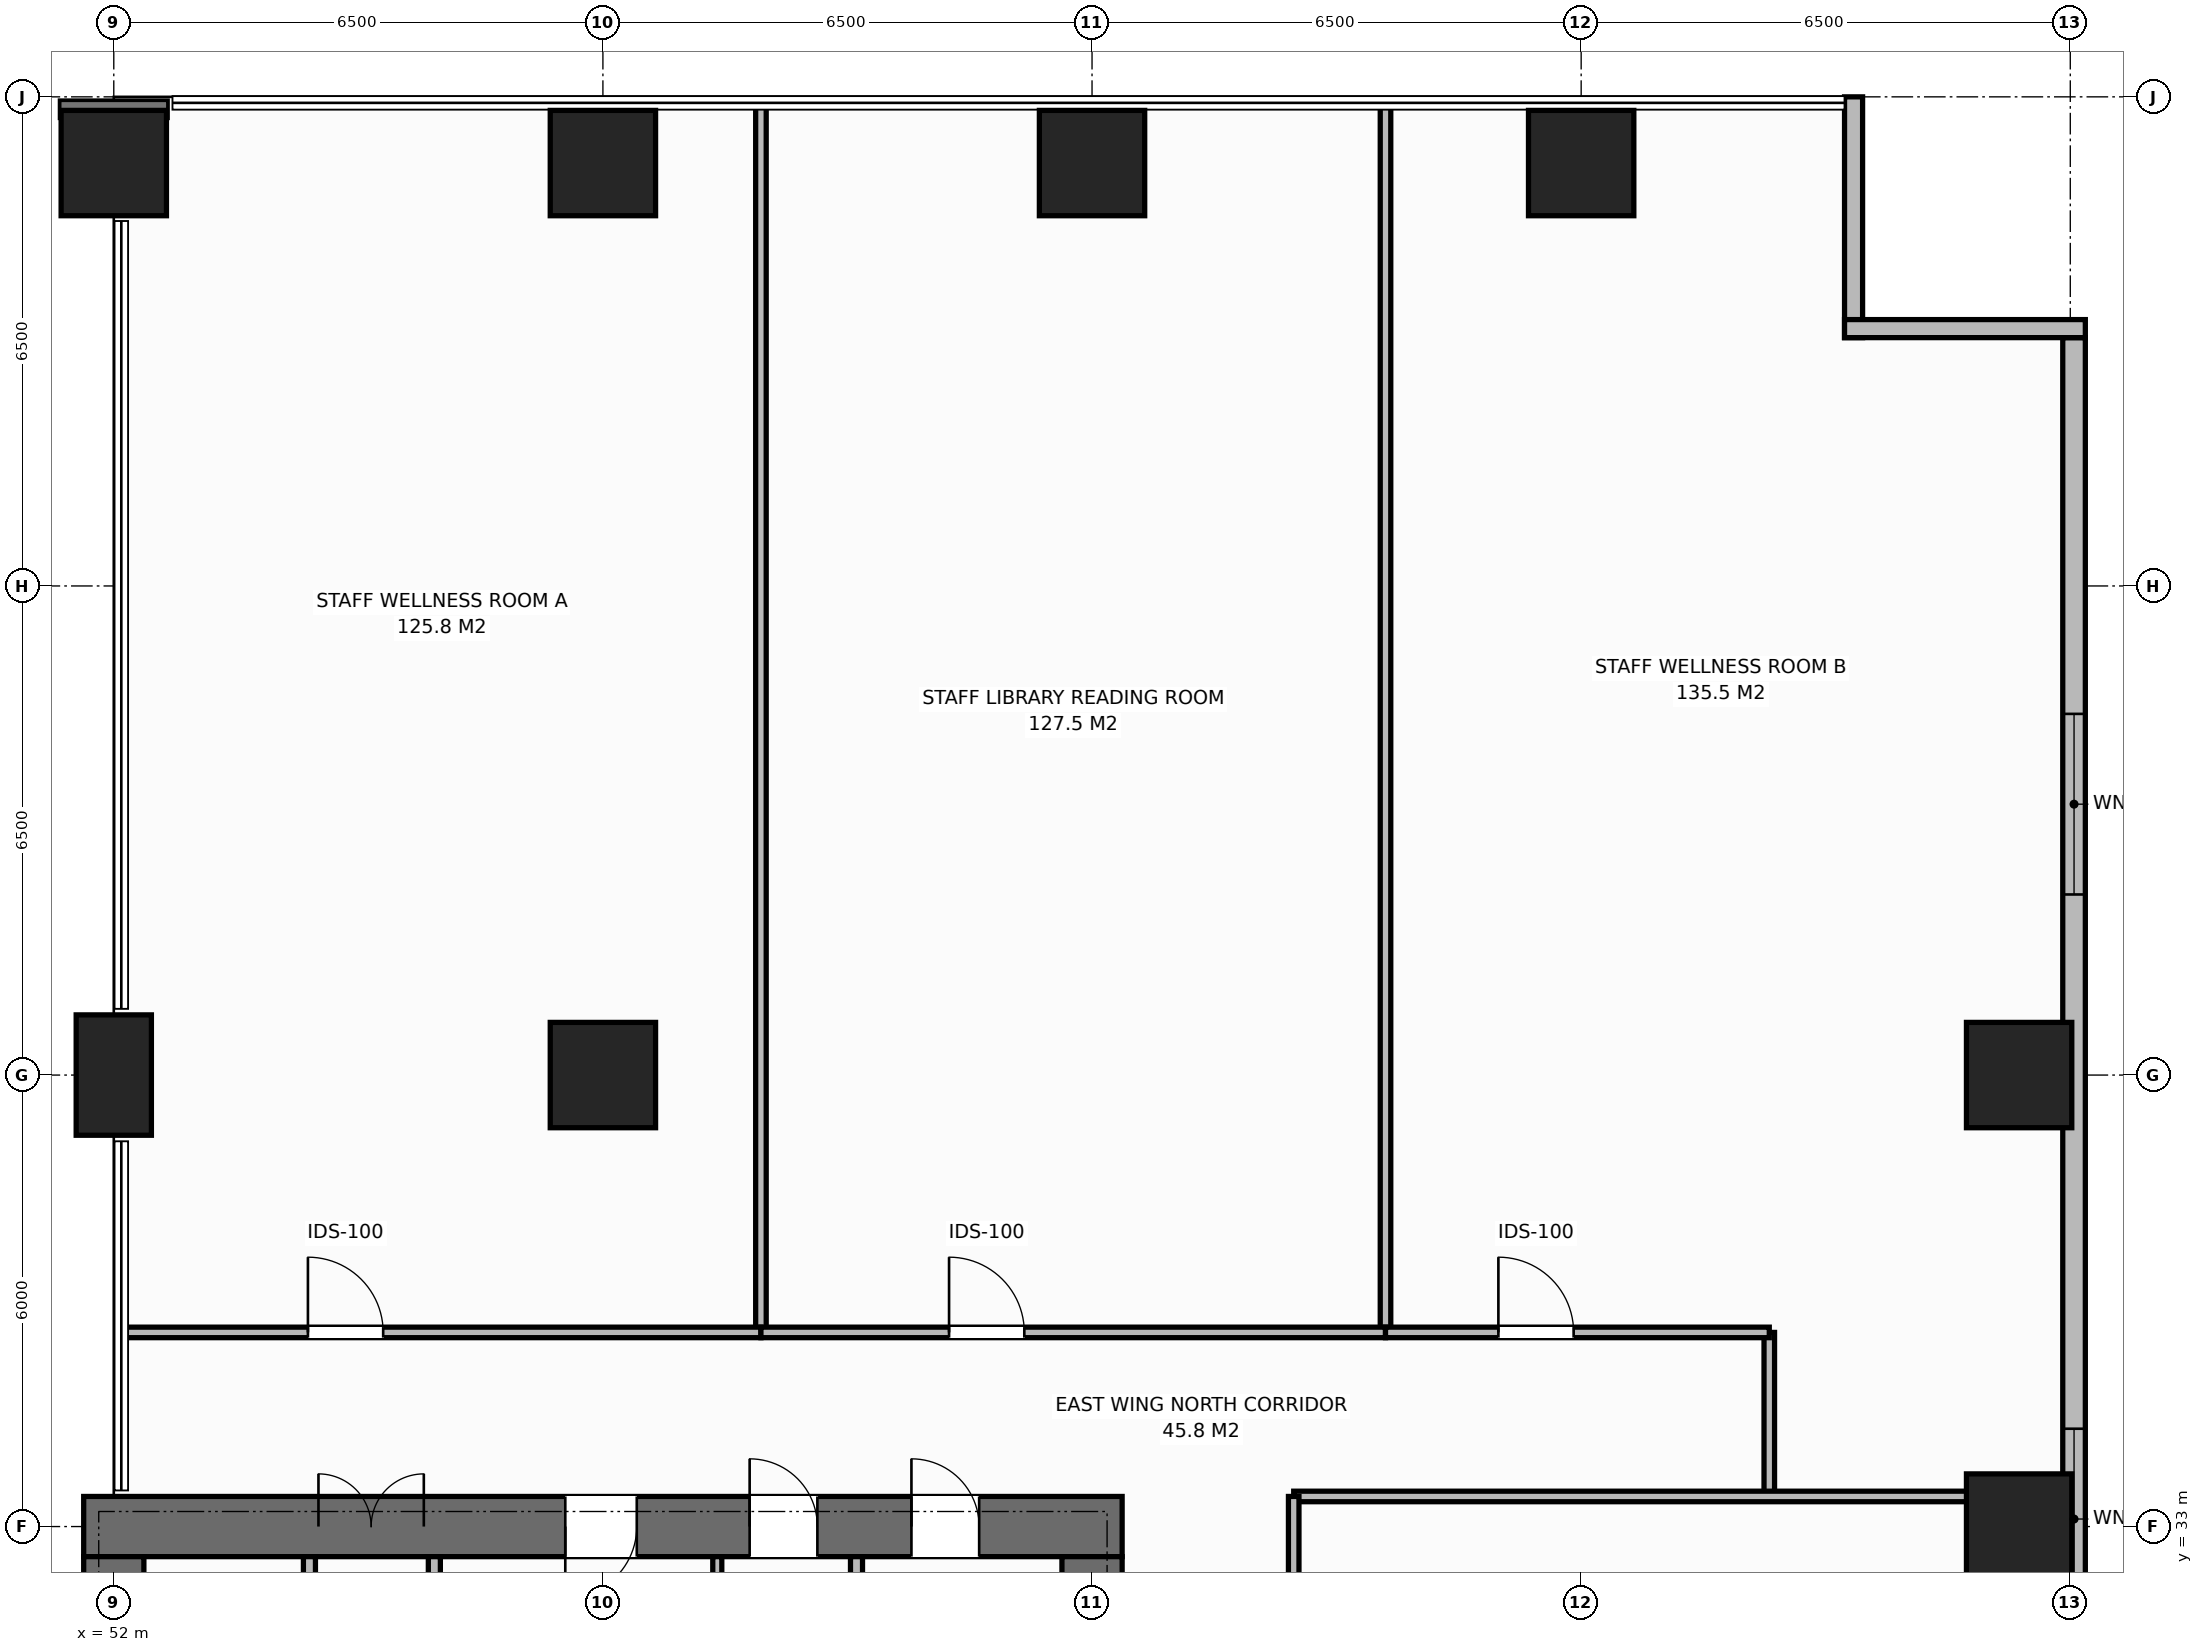
"""IFC4 building model, lengths in metres.
Left out: names, types, materials, properties, quantities, classifications, styles, units other than length and angle.
Written with IfcOpenShell. Run it as: python <this file> out.ifc"""

import sys

from ifc_helpers import new_model, si_unit, direction, frame, frame_2d, origin, origin_2d, place, context, subcontext, project, spatial, rectangle, extrude, element, fill, save


model = new_model("IFC4")
c1 = context("Model", 3, precision=1e-05, world=origin(), true_north=direction((0.0, 1.0)))
c2 = subcontext(c1, "Body", "Model", "MODEL_VIEW")
j1 = project(units=[si_unit("LENGTHUNIT", "METRE"), si_unit("PLANEANGLEUNIT", "RADIAN")], contexts=[c1])
p1 = place(None, origin())
s1 = spatial("IfcSite", under=j1, at=p1, CompositionType="ELEMENT")
p2 = place(p1, origin())
s2 = spatial("IfcBuilding", under=s1, at=p2, CompositionType="ELEMENT")
p3 = place(p2, frame((0.0, 0.0, 17.0)))
s3 = spatial("IfcBuildingStorey", under=s2, at=p3, CompositionType="ELEMENT", Elevation=17.0)
p4 = place(p3, frame((51.6, 33.0, 0.0), z_axis=(0.0, 0.0, 1.0), x_axis=(1.0, 0.0, 0.0)))
e1 = element("IfcWall", 1, at=p4, inside=s3, PredefinedType="SHEAR", context=c2, shape_type="SweptSolid", body=[
    extrude(rectangle(XDim=13.8, YDim=0.8, at=frame_2d((6.9, 0.0))), origin(), (0.0, 0.0, 1.0), 5.0),
])
p5 = place(p4, frame((3.12, 0.0, 0.0)))
e2 = element("IfcOpeningElement", 2, at=p5, cuts=e1, PredefinedType="OPENING", context=c2, shape_type="SweptSolid", body=[
    extrude(rectangle(XDim=1.4, YDim=2.2, at=frame_2d((0.7, 1.1))), frame((0.0, 0.41, 0.0), z_axis=(0.0, -1.0, 0.0), x_axis=(1.0, 0.0, 0.0)), (0.0, 0.0, 1.0), 0.82),
])
p6 = place(p4, frame((11.0, 0.0, 0.0)))
e3 = element("IfcOpeningElement", 3, at=p6, cuts=e1, PredefinedType="OPENING", context=c2, shape_type="SweptSolid", body=[
    extrude(rectangle(XDim=0.9, YDim=2.15, at=frame_2d((0.45, 1.075))), frame((0.0, 0.41, 0.0), z_axis=(0.0, -1.0, 0.0), x_axis=(1.0, 0.0, 0.0)), (0.0, 0.0, 1.0), 0.82),
])
p7 = place(p4, frame((6.4, 0.0, 0.0)))
e4 = element("IfcOpeningElement", 4, at=p7, cuts=e1, PredefinedType="OPENING", context=c2, shape_type="SweptSolid", body=[
    extrude(rectangle(XDim=0.95, YDim=2.15, at=frame_2d((0.475, 1.075))), frame((0.0, 0.41, 0.0), z_axis=(0.0, -1.0, 0.0), x_axis=(1.0, 0.0, 0.0)), (0.0, 0.0, 1.0), 0.82),
])
p8 = place(p4, frame((8.85, 0.0, 0.0)))
e5 = element("IfcOpeningElement", 5, at=p8, cuts=e1, PredefinedType="OPENING", context=c2, shape_type="SweptSolid", body=[
    extrude(rectangle(XDim=0.9, YDim=2.15, at=frame_2d((0.45, 1.075))), frame((0.0, 0.41, 0.0), z_axis=(0.0, -1.0, 0.0), x_axis=(1.0, 0.0, 0.0)), (0.0, 0.0, 1.0), 0.82),
])
p9 = place(p3, frame((52.0, 19.4, 0.0), z_axis=(0.0, 0.0, 1.0), x_axis=(0.0, 1.0, 0.0)))
e6 = element("IfcWall", 6, at=p9, inside=s3, PredefinedType="SHEAR", context=c2, shape_type="SweptSolid", body=[
    extrude(rectangle(XDim=13.2, YDim=0.8, at=frame_2d((6.6, 0.0))), origin(), (0.0, 0.0, 1.0), 5.0),
])
p10 = place(p3, frame((65.0, 19.4, 0.0), z_axis=(0.0, 0.0, 1.0), x_axis=(0.0, 1.0, 0.0)))
e7 = element("IfcWall", 7, at=p10, inside=s3, PredefinedType="SHEAR", context=c2, shape_type="SweptSolid", body=[
    extrude(rectangle(XDim=13.2, YDim=0.8, at=frame_2d((6.6, 0.0))), origin(), (0.0, 0.0, 1.0), 5.0),
])
p11 = place(p10, frame((8.05, 0.0, 0.0)))
e8 = element("IfcOpeningElement", 8, at=p11, cuts=e7, PredefinedType="OPENING", context=c2, shape_type="SweptSolid", body=[
    extrude(rectangle(XDim=1.3, YDim=2.2, at=frame_2d((0.65, 1.1))), frame((0.0, 0.41, 0.0), z_axis=(0.0, -1.0, 0.0), x_axis=(1.0, 0.0, 0.0)), (0.0, 0.0, 1.0), 0.82),
])
p12 = place(p3, frame((58.5, 39.0, 0.0), z_axis=(0.0, 0.0, 1.0), x_axis=(1.0, 0.0, 0.0)))
e9 = element("IfcColumn", 9, at=p12, inside=s3, PredefinedType="COLUMN", context=c2, shape_type="SweptSolid", body=[
    extrude(rectangle(XDim=1.4, YDim=1.4, at=origin_2d()), origin(), (0.0, 0.0, 1.0), 5.0),
])
p13 = place(p3, frame((52.0, 39.0, 0.0), z_axis=(0.0, 0.0, 1.0), x_axis=(1.0, 0.0, 0.0)))
e10 = element("IfcColumn", 10, at=p13, inside=s3, PredefinedType="PILASTER", context=c2, shape_type="SweptSolid", body=[
    extrude(rectangle(XDim=1.0, YDim=1.6, at=origin_2d()), origin(), (0.0, 0.0, 1.0), 5.0),
])
for number, where, z_axis, x_axis in (
    (11, (52.0, 51.12, 0.0), (0.0, 0.0, 1.0), (1.0, 0.0, 0.0)),
    (12, (58.5, 51.12, 0.0), (0.0, 0.0, 1.0), (1.0, 0.0, 0.0)),
    (13, (65.0, 51.12, 0.0), (0.0, 0.0, 1.0), (1.0, 0.0, 0.0)),
    (14, (71.5, 51.12, 0.0), (0.0, 0.0, 1.0), (1.0, 0.0, 0.0)),
    (15, (77.32, 33.0, 0.0), (0.0, 0.0, 1.0), (1.0, 0.0, 0.0)),
    (16, (77.32, 39.0, 0.0), (0.0, 0.0, 1.0), (1.0, 0.0, 0.0)),
):
    element("IfcColumn", number, at=place(p3, frame(where, z_axis=z_axis, x_axis=x_axis)), inside=s3, PredefinedType="COLUMN", context=c2, shape_type="SweptSolid", body=[
        extrude(rectangle(XDim=1.4, YDim=1.4, at=origin_2d()), origin(), (0.0, 0.0, 1.0), 5.0),
    ])
p14 = place(p3, frame((78.05, 48.8, 0.0), z_axis=(0.0, 0.0, 1.0), x_axis=(0.0, -1.0, 0.0)))
e17 = element("IfcWall", 17, at=p14, inside=s3, PredefinedType="STANDARD", context=c2, shape_type="SweptSolid", body=[
    extrude(rectangle(XDim=45.6, YDim=0.3, at=frame_2d((22.8, 0.0))), origin(), (0.0, 0.0, 1.0), 4.4),
])
p15 = place(p14, frame((5.0, 0.0, 0.9)))
e18 = element("IfcOpeningElement", 18, at=p15, cuts=e17, PredefinedType="OPENING", context=c2, shape_type="SweptSolid", body=[
    extrude(rectangle(XDim=2.4, YDim=2.2, at=frame_2d((1.2, 1.1))), frame((0.0, 0.16, 0.0), z_axis=(0.0, -1.0, 0.0), x_axis=(1.0, 0.0, 0.0)), (0.0, 0.0, 1.0), 0.32),
])
p16 = place(p14, frame((14.5, 0.0, 0.9)))
e19 = element("IfcOpeningElement", 19, at=p16, cuts=e17, PredefinedType="OPENING", context=c2, shape_type="SweptSolid", body=[
    extrude(rectangle(XDim=2.4, YDim=2.2, at=frame_2d((1.2, 1.1))), frame((0.0, 0.16, 0.0), z_axis=(0.0, -1.0, 0.0), x_axis=(1.0, 0.0, 0.0)), (0.0, 0.0, 1.0), 0.32),
])
p17 = place(p14, frame((25.5, 0.0, 0.9)))
e20 = element("IfcOpeningElement", 20, at=p17, cuts=e17, PredefinedType="OPENING", context=c2, shape_type="SweptSolid", body=[
    extrude(rectangle(XDim=2.4, YDim=2.2, at=frame_2d((1.2, 1.1))), frame((0.0, 0.16, 0.0), z_axis=(0.0, -1.0, 0.0), x_axis=(1.0, 0.0, 0.0)), (0.0, 0.0, 1.0), 0.32),
])
p18 = place(p14, frame((35.0, 0.0, 0.9)))
e21 = element("IfcOpeningElement", 21, at=p18, cuts=e17, PredefinedType="OPENING", context=c2, shape_type="SweptSolid", body=[
    extrude(rectangle(XDim=2.4, YDim=2.2, at=frame_2d((1.2, 1.1))), frame((0.0, 0.16, 0.0), z_axis=(0.0, -1.0, 0.0), x_axis=(1.0, 0.0, 0.0)), (0.0, 0.0, 1.0), 0.32),
])
for number, where, z_axis, x_axis in (
    (22, (75.12, 52.0, 0.0), (0.0, 0.0, 1.0), (0.0, -1.0, 0.0)),
    (23, (75.0, 48.92, 0.0), (0.0, 0.0, 1.0), (1.0, 0.0, 0.0)),
):
    element("IfcWall", number, at=place(p3, frame(where, z_axis=z_axis, x_axis=x_axis)), inside=s3, PredefinedType="STANDARD", context=c2, shape_type="SweptSolid", body=[
        extrude(rectangle(XDim=3.2, YDim=0.24, at=frame_2d((1.6, 0.0))), origin(), (0.0, 0.0, 1.0), 4.4),
    ])
p19 = place(p3, frame((54.6, 19.4, 0.0), z_axis=(0.0, 0.0, 1.0), x_axis=(0.0, 1.0, 0.0)))
e24 = element("IfcWall", 24, at=p19, inside=s3, PredefinedType="STANDARD", context=c2, shape_type="SweptSolid", body=[
    extrude(rectangle(XDim=13.2, YDim=0.16, at=frame_2d((6.6, 0.0))), origin(), (0.0, 0.0, 1.0), 4.4),
])
p20 = place(p19, frame((0.55, 0.0, 0.0)))
e25 = element("IfcOpeningElement", 25, at=p20, cuts=e24, PredefinedType="OPENING", context=c2, shape_type="SweptSolid", body=[
    extrude(rectangle(XDim=1.1, YDim=2.2, at=frame_2d((0.55, 1.1))), frame((0.0, 0.09, 0.0), z_axis=(0.0, -1.0, 0.0), x_axis=(1.0, 0.0, 0.0)), (0.0, 0.0, 1.0), 0.18),
])
p21 = place(p19, frame((2.7, 0.0, 0.0)))
e26 = element("IfcOpeningElement", 26, at=p21, cuts=e24, PredefinedType="OPENING", context=c2, shape_type="SweptSolid", body=[
    extrude(rectangle(XDim=1.1, YDim=2.2, at=frame_2d((0.55, 1.1))), frame((0.0, 0.09, 0.0), z_axis=(0.0, -1.0, 0.0), x_axis=(1.0, 0.0, 0.0)), (0.0, 0.0, 1.0), 0.18),
])
p22 = place(p3, frame((56.26, 23.09, 0.0), z_axis=(0.0, 0.0, 1.0), x_axis=(0.0, 1.0, 0.0)))
e27 = element("IfcWall", 27, at=p22, inside=s3, PredefinedType="STANDARD", context=c2, shape_type="SweptSolid", body=[
    extrude(rectangle(XDim=9.51, YDim=0.16, at=frame_2d((4.755, 0.0))), origin(), (0.0, 0.0, 1.0), 4.4),
])
p23 = place(p22, frame((1.01, 0.0, 0.0)))
e28 = element("IfcOpeningElement", 28, at=p23, cuts=e27, PredefinedType="OPENING", context=c2, shape_type="SweptSolid", body=[
    extrude(rectangle(XDim=1.3, YDim=2.2, at=frame_2d((0.65, 1.1))), frame((0.0, 0.09, 0.0), z_axis=(0.0, -1.0, 0.0), x_axis=(1.0, 0.0, 0.0)), (0.0, 0.0, 1.0), 0.18),
])
p24 = place(p3, frame((61.87, 26.56, 0.0), z_axis=(0.0, 0.0, 1.0), x_axis=(0.0, 1.0, 0.0)))
e29 = element("IfcWall", 29, at=p24, inside=s3, PredefinedType="STANDARD", context=c2, shape_type="SweptSolid", body=[
    extrude(rectangle(XDim=6.04, YDim=0.16, at=frame_2d((3.02, 0.0))), origin(), (0.0, 0.0, 1.0), 4.4),
])
p25 = place(p3, frame((60.02, 26.56, 0.0), z_axis=(0.0, 0.0, 1.0), x_axis=(0.0, 1.0, 0.0)))
e30 = element("IfcWall", 30, at=p25, inside=s3, PredefinedType="PARTITIONING", context=c2, shape_type="SweptSolid", body=[
    extrude(rectangle(XDim=6.04, YDim=0.12, at=frame_2d((3.02, 0.0))), origin(), (0.0, 0.0, 1.0), 4.4),
])
for number, where, z_axis, x_axis in (
    (31, (60.6, 35.58, 0.0), (0.0, 0.0, 1.0), (0.0, 1.0, 0.0)),
    (32, (68.9, 35.58, 0.0), (0.0, 0.0, 1.0), (0.0, 1.0, 0.0)),
):
    element("IfcWall", number, at=place(p3, frame(where, z_axis=z_axis, x_axis=x_axis)), inside=s3, PredefinedType="PARTITIONING", context=c2, shape_type="SweptSolid", body=[
        extrude(rectangle(XDim=16.36, YDim=0.14, at=frame_2d((8.18, 0.0))), origin(), (0.0, 0.0, 1.0), 4.4),
    ])
p26 = place(p3, frame((74.0, 33.4, 0.0), z_axis=(0.0, 0.0, 1.0), x_axis=(0.0, 1.0, 0.0)))
e33 = element("IfcWall", 33, at=p26, inside=s3, PredefinedType="PARTITIONING", context=c2, shape_type="SweptSolid", body=[
    extrude(rectangle(XDim=2.18, YDim=0.14, at=frame_2d((1.09, 0.0))), origin(), (0.0, 0.0, 1.0), 4.4),
])
p27 = place(p3, frame((67.68, 33.4, 0.0), z_axis=(0.0, 0.0, 1.0), x_axis=(1.0, 0.0, 0.0)))
e34 = element("IfcWall", 34, at=p27, inside=s3, PredefinedType="PARTITIONING", context=c2, shape_type="SweptSolid", body=[
    extrude(rectangle(XDim=10.32, YDim=0.14, at=frame_2d((5.16, 0.0))), origin(), (0.0, 0.0, 1.0), 4.4),
])
p28 = place(p3, frame((52.08, 35.58, 0.0), z_axis=(0.0, 0.0, 1.0), x_axis=(1.0, 0.0, 0.0)))
e35 = element("IfcWall", 35, at=p28, inside=s3, PredefinedType="PARTITIONING", context=c2, shape_type="SweptSolid", body=[
    extrude(rectangle(XDim=8.52, YDim=0.14, at=frame_2d((4.26, 0.0))), origin(), (0.0, 0.0, 1.0), 4.4),
])
p29 = place(p28, frame((2.5, 0.0, 0.0)))
e36 = element("IfcOpeningElement", 36, at=p29, cuts=e35, PredefinedType="OPENING", context=c2, shape_type="SweptSolid", body=[
    extrude(rectangle(XDim=1.0, YDim=2.15, at=frame_2d((0.5, 1.075))), frame((0.0, 0.08, 0.0), z_axis=(0.0, -1.0, 0.0), x_axis=(1.0, 0.0, 0.0)), (0.0, 0.0, 1.0), 0.16),
])
p30 = place(p3, frame((60.6, 35.58, 0.0), z_axis=(0.0, 0.0, 1.0), x_axis=(1.0, 0.0, 0.0)))
e37 = element("IfcWall", 37, at=p30, inside=s3, PredefinedType="PARTITIONING", context=c2, shape_type="SweptSolid", body=[
    extrude(rectangle(XDim=8.3, YDim=0.14, at=frame_2d((4.15, 0.0))), origin(), (0.0, 0.0, 1.0), 4.4),
])
p31 = place(p30, frame((2.5, 0.0, 0.0)))
e38 = element("IfcOpeningElement", 38, at=p31, cuts=e37, PredefinedType="OPENING", context=c2, shape_type="SweptSolid", body=[
    extrude(rectangle(XDim=1.0, YDim=2.15, at=frame_2d((0.5, 1.075))), frame((0.0, 0.08, 0.0), z_axis=(0.0, -1.0, 0.0), x_axis=(1.0, 0.0, 0.0)), (0.0, 0.0, 1.0), 0.16),
])
p32 = place(p3, frame((68.9, 35.58, 0.0), z_axis=(0.0, 0.0, 1.0), x_axis=(1.0, 0.0, 0.0)))
e39 = element("IfcWall", 39, at=p32, inside=s3, PredefinedType="PARTITIONING", context=c2, shape_type="SweptSolid", body=[
    extrude(rectangle(XDim=5.1, YDim=0.14, at=frame_2d((2.55, 0.0))), origin(), (0.0, 0.0, 1.0), 4.4),
])
p33 = place(p32, frame((1.5, 0.0, 0.0)))
e40 = element("IfcOpeningElement", 40, at=p33, cuts=e39, PredefinedType="OPENING", context=c2, shape_type="SweptSolid", body=[
    extrude(rectangle(XDim=1.0, YDim=2.15, at=frame_2d((0.5, 1.075))), frame((0.0, 0.08, 0.0), z_axis=(0.0, -1.0, 0.0), x_axis=(1.0, 0.0, 0.0)), (0.0, 0.0, 1.0), 0.16),
])
p34 = place(p3, frame((67.68, 24.1, 0.0), z_axis=(0.0, 0.0, 1.0), x_axis=(0.0, 1.0, 0.0)))
e41 = element("IfcWall", 41, at=p34, inside=s3, PredefinedType="PARTITIONING", context=c2, shape_type="SweptSolid", body=[
    extrude(rectangle(XDim=9.3, YDim=0.14, at=frame_2d((4.65, 0.0))), origin(), (0.0, 0.0, 1.0), 4.4),
])
p35 = place(p34, frame((2.5, 0.0, 0.0)))
e42 = element("IfcOpeningElement", 42, at=p35, cuts=e41, PredefinedType="OPENING", context=c2, shape_type="SweptSolid", body=[
    extrude(rectangle(XDim=0.95, YDim=2.15, at=frame_2d((0.475, 1.075))), frame((0.0, 0.08, 0.0), z_axis=(0.0, -1.0, 0.0), x_axis=(1.0, 0.0, 0.0)), (0.0, 0.0, 1.0), 0.16),
])
p36 = place(p15, origin())
e43 = element("IfcWindow", 43, at=p36, inside=s3, PartitioningType="SINGLE_PANEL", PredefinedType="WINDOW", context=c2, shape_type="SweptSolid", body=[
    extrude(rectangle(XDim=2.4, YDim=2.2, at=frame_2d((1.2, 1.1))), frame((0.0, 0.03, 0.0), z_axis=(0.0, -1.0, 0.0), x_axis=(1.0, 0.0, 0.0)), (0.0, 0.0, 1.0), 0.06),
])
fill(e18, e43)
p37 = place(p16, origin())
e44 = element("IfcWindow", 44, at=p37, inside=s3, PartitioningType="SINGLE_PANEL", PredefinedType="WINDOW", context=c2, shape_type="SweptSolid", body=[
    extrude(rectangle(XDim=2.4, YDim=2.2, at=frame_2d((1.2, 1.1))), frame((0.0, 0.03, 0.0), z_axis=(0.0, -1.0, 0.0), x_axis=(1.0, 0.0, 0.0)), (0.0, 0.0, 1.0), 0.06),
])
fill(e19, e44)
p38 = place(p5, origin())
e45 = element("IfcDoor", 45, at=p38, inside=s3, OperationType="DOUBLE_DOOR_SINGLE_SWING", PredefinedType="DOOR", context=c2, shape_type="SweptSolid", body=[
    extrude(rectangle(XDim=1.4, YDim=2.2, at=frame_2d((0.7, 1.1))), frame((0.0, -0.075, 0.0), z_axis=(0.0, -1.0, 0.0), x_axis=(1.0, 0.0, 0.0)), (0.0, 0.0, 1.0), 0.05),
])
fill(e2, e45)
p39 = place(p6, origin())
e46 = element("IfcDoor", 46, at=p39, inside=s3, OperationType="SINGLE_SWING_LEFT", PredefinedType="DOOR", context=c2, shape_type="SweptSolid", body=[
    extrude(rectangle(XDim=0.9, YDim=2.15, at=frame_2d((0.45, 1.075))), frame((0.0, -0.075, 0.0), z_axis=(0.0, -1.0, 0.0), x_axis=(1.0, 0.0, 0.0)), (0.0, 0.0, 1.0), 0.05),
])
fill(e3, e46)
p40 = place(p7, origin())
e47 = element("IfcDoor", 47, at=p40, inside=s3, OperationType="SINGLE_SWING_RIGHT", PredefinedType="DOOR", context=c2, shape_type="SweptSolid", body=[
    extrude(rectangle(XDim=0.95, YDim=2.15, at=frame_2d((0.475, 1.075))), frame((0.0, -0.075, 0.0), z_axis=(0.0, -1.0, 0.0), x_axis=(1.0, 0.0, 0.0)), (0.0, 0.0, 1.0), 0.05),
])
fill(e4, e47)
p41 = place(p8, origin())
e48 = element("IfcDoor", 48, at=p41, inside=s3, OperationType="SINGLE_SWING_LEFT", PredefinedType="DOOR", context=c2, shape_type="SweptSolid", body=[
    extrude(rectangle(XDim=0.9, YDim=2.15, at=frame_2d((0.45, 1.075))), frame((0.0, -0.075, 0.0), z_axis=(0.0, -1.0, 0.0), x_axis=(1.0, 0.0, 0.0)), (0.0, 0.0, 1.0), 0.05),
])
fill(e5, e48)
p42 = place(p29, origin())
e49 = element("IfcDoor", 49, at=p42, inside=s3, OperationType="SINGLE_SWING_LEFT", PredefinedType="DOOR", context=c2, shape_type="SweptSolid", body=[
    extrude(rectangle(XDim=1.0, YDim=2.15, at=frame_2d((0.5, 1.075))), frame((0.0, 0.025, 0.0), z_axis=(0.0, -1.0, 0.0), x_axis=(1.0, 0.0, 0.0)), (0.0, 0.0, 1.0), 0.05),
])
fill(e36, e49)
p43 = place(p31, origin())
e50 = element("IfcDoor", 50, at=p43, inside=s3, OperationType="SINGLE_SWING_LEFT", PredefinedType="DOOR", context=c2, shape_type="SweptSolid", body=[
    extrude(rectangle(XDim=1.0, YDim=2.15, at=frame_2d((0.5, 1.075))), frame((0.0, 0.025, 0.0), z_axis=(0.0, -1.0, 0.0), x_axis=(1.0, 0.0, 0.0)), (0.0, 0.0, 1.0), 0.05),
])
fill(e38, e50)
p44 = place(p33, origin())
e51 = element("IfcDoor", 51, at=p44, inside=s3, OperationType="SINGLE_SWING_LEFT", PredefinedType="DOOR", context=c2, shape_type="SweptSolid", body=[
    extrude(rectangle(XDim=1.0, YDim=2.15, at=frame_2d((0.5, 1.075))), frame((0.0, 0.025, 0.0), z_axis=(0.0, -1.0, 0.0), x_axis=(1.0, 0.0, 0.0)), (0.0, 0.0, 1.0), 0.05),
])
fill(e40, e51)
save(model, sys.argv[1])
